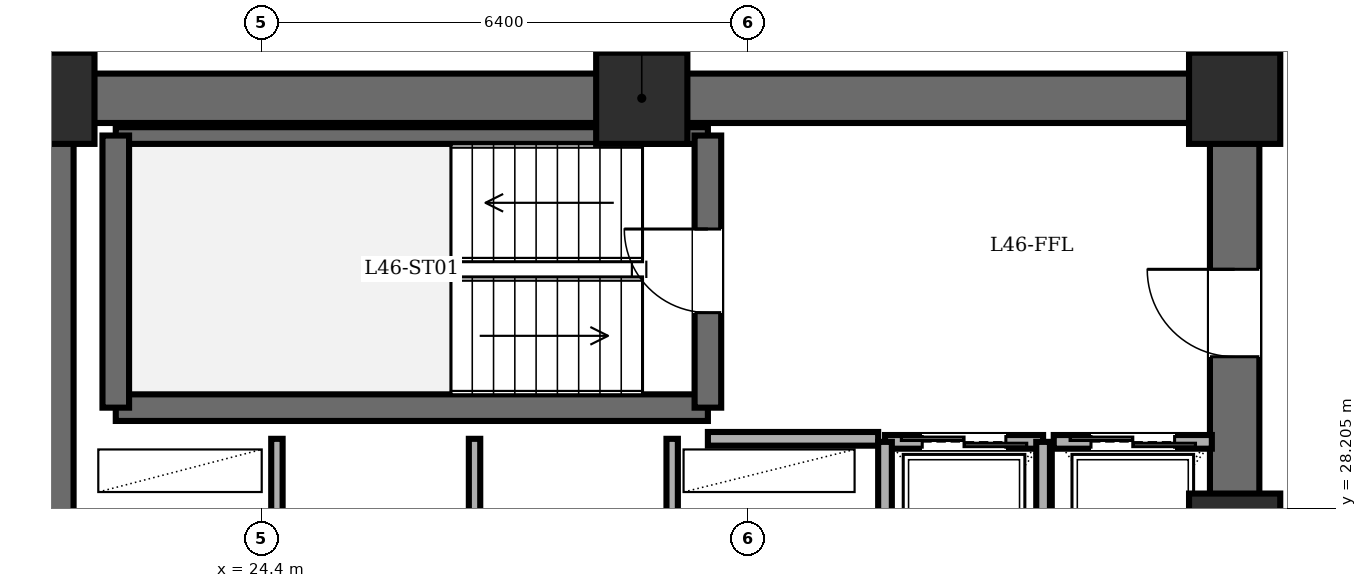
"""IFC4 building model, lengths in metres.
Left out: names, types, materials, properties, quantities, classifications, styles, units other than length and angle.
Written with IfcOpenShell. Run it as: python <this file> out.ifc"""

import sys

from ifc_helpers import new_model, si_unit, direction, frame, frame_2d, origin, origin_2d, place, context, subcontext, project, spatial, rectangle, extrude, element, fill, save


model = new_model("IFC4")
c1 = context("Model", 3, precision=1e-05, world=origin(), true_north=direction((0.0, 1.0)))
c2 = subcontext(c1, "Body", "Model", "MODEL_VIEW")
j1 = project(units=[si_unit("LENGTHUNIT", "METRE"), si_unit("PLANEANGLEUNIT", "RADIAN")], contexts=[c1])
p1 = place(None, origin())
s1 = spatial("IfcSite", under=j1, at=p1, CompositionType="ELEMENT")
p2 = place(p1, origin())
s2 = spatial("IfcBuilding", under=s1, at=p2, CompositionType="ELEMENT")
p3 = place(p2, frame((0.0, 0.0, 176.2)))
s3 = spatial("IfcBuildingStorey", under=s2, at=p3, CompositionType="ELEMENT", Elevation=176.2)
for number, where, z_axis, x_axis in (
    (1, (37.2, 27.8, 0.0), (0.0, 0.0, 1.0), (1.0, 0.0, 0.0)),
    (2, (37.2, 33.6, 0.0), (0.0, 0.0, 1.0), (1.0, 0.0, 0.0)),
    (3, (29.4, 33.6, 0.0), (0.0, 0.0, 1.0), (1.0, 0.0, 0.0)),
    (4, (21.6, 33.6, 0.0), (0.0, 0.0, 1.0), (1.0, 0.0, 0.0)),
):
    element("IfcColumn", number, at=place(p3, frame(where, z_axis=z_axis, x_axis=x_axis)), inside=s3, PredefinedType="COLUMN", context=c2, shape_type="SweptSolid", body=[
        extrude(rectangle(XDim=1.2, YDim=1.2, at=origin_2d()), origin(), (0.0, 0.0, 1.0), 3.6),
    ])
p4 = place(p3, frame((21.6, 14.4, 0.0), z_axis=(0.0, 0.0, 1.0), x_axis=(0.0, 1.0, 0.0)))
e5 = element("IfcWall", 5, at=p4, inside=s3, PredefinedType="SHEAR", context=c2, shape_type="SweptSolid", body=[
    extrude(rectangle(XDim=19.2, YDim=0.65, at=frame_2d((9.6, 0.0))), origin(), (0.0, 0.0, 1.0), 3.4),
])
p5 = place(p3, frame((21.6, 33.6, 0.0), z_axis=(0.0, 0.0, 1.0), x_axis=(1.0, 0.0, 0.0)))
e6 = element("IfcWall", 6, at=p5, inside=s3, PredefinedType="SHEAR", context=c2, shape_type="SweptSolid", body=[
    extrude(rectangle(XDim=15.6, YDim=0.65, at=frame_2d((7.8, 0.0))), origin(), (0.0, 0.0, 1.0), 3.4),
])
p6 = place(p3, frame((37.2, 14.4, 0.0), z_axis=(0.0, 0.0, 1.0), x_axis=(0.0, 1.0, 0.0)))
e7 = element("IfcWall", 7, at=p6, inside=s3, PredefinedType="SHEAR", context=c2, shape_type="SweptSolid", body=[
    extrude(rectangle(XDim=19.2, YDim=0.65, at=frame_2d((9.6, 0.0))), origin(), (0.0, 0.0, 1.0), 3.4),
])
p7 = place(p6, frame((15.8, 0.0, 0.0)))
e8 = element("IfcOpeningElement", 8, at=p7, cuts=e7, PredefinedType="OPENING", context=c2, shape_type="SweptSolid", body=[
    extrude(rectangle(XDim=1.15, YDim=2.15, at=frame_2d((0.575, 1.075))), frame((0.0, 0.335, 0.0), z_axis=(0.0, -1.0, 0.0), x_axis=(1.0, 0.0, 0.0)), (0.0, 0.0, 1.0), 0.67),
])
p8 = place(p6, frame((3.6, 0.0, 0.0)))
e9 = element("IfcOpeningElement", 9, at=p8, cuts=e7, PredefinedType="OPENING", context=c2, shape_type="SweptSolid", body=[
    extrude(rectangle(XDim=1.1, YDim=2.15, at=frame_2d((0.55, 1.075))), frame((0.0, 0.335, 0.0), z_axis=(0.0, -1.0, 0.0), x_axis=(1.0, 0.0, 0.0)), (0.0, 0.0, 1.0), 0.67),
])
p9 = place(p6, frame((8.6, 0.0, 0.0)))
e10 = element("IfcOpeningElement", 10, at=p9, cuts=e7, PredefinedType="OPENING", context=c2, shape_type="SweptSolid", body=[
    extrude(rectangle(XDim=1.3, YDim=2.2, at=frame_2d((0.65, 1.1))), frame((0.0, 0.335, 0.0), z_axis=(0.0, -1.0, 0.0), x_axis=(1.0, 0.0, 0.0)), (0.0, 0.0, 1.0), 0.67),
])
p10 = place(p3, frame((22.48, 29.53, 0.0), z_axis=(0.0, 0.0, 1.0), x_axis=(1.0, 0.0, 0.0)))
e11 = element("IfcWall", 11, at=p10, inside=s3, PredefinedType="SOLIDWALL", context=c2, shape_type="SweptSolid", body=[
    extrude(rectangle(XDim=7.79, YDim=0.35, at=frame_2d((3.895, 0.0))), origin(), (0.0, 0.0, 1.0), 3.4),
])
p11 = place(p3, frame((22.48, 33.11, 0.0), z_axis=(0.0, 0.0, 1.0), x_axis=(1.0, 0.0, 0.0)))
e12 = element("IfcWall", 12, at=p11, inside=s3, PredefinedType="PARTITIONING", context=c2, shape_type="SweptSolid", body=[
    extrude(rectangle(XDim=7.79, YDim=0.22, at=frame_2d((3.895, 0.0))), origin(), (0.0, 0.0, 1.0), 3.4),
])
p12 = place(p3, frame((22.48, 29.53, 0.0), z_axis=(0.0, 0.0, 1.0), x_axis=(0.0, 1.0, 0.0)))
e13 = element("IfcWall", 13, at=p12, inside=s3, PredefinedType="SOLIDWALL", context=c2, shape_type="SweptSolid", body=[
    extrude(rectangle(XDim=3.58, YDim=0.35, at=frame_2d((1.79, 0.0))), origin(), (0.0, 0.0, 1.0), 3.4),
])
p13 = place(p3, frame((30.27, 29.53, 0.0), z_axis=(0.0, 0.0, 1.0), x_axis=(0.0, 1.0, 0.0)))
e14 = element("IfcWall", 14, at=p13, inside=s3, PredefinedType="SOLIDWALL", context=c2, shape_type="SweptSolid", body=[
    extrude(rectangle(XDim=3.58, YDim=0.35, at=frame_2d((1.79, 0.0))), origin(), (0.0, 0.0, 1.0), 3.4),
])
p14 = place(p13, frame((1.25, 0.0, 0.0)))
e15 = element("IfcOpeningElement", 15, at=p14, cuts=e14, PredefinedType="OPENING", context=c2, shape_type="SweptSolid", body=[
    extrude(rectangle(XDim=1.1, YDim=2.15, at=frame_2d((0.55, 1.075))), frame((0.0, 0.185, 0.0), z_axis=(0.0, -1.0, 0.0), x_axis=(1.0, 0.0, 0.0)), (0.0, 0.0, 1.0), 0.37),
])
p15 = place(p3, frame((30.27, 29.12, 0.0), z_axis=(0.0, 0.0, 1.0), x_axis=(1.0, 0.0, 0.0)))
e16 = element("IfcWall", 16, at=p15, inside=s3, PredefinedType="PARTITIONING", context=c2, shape_type="SweptSolid", body=[
    extrude(rectangle(XDim=2.24, YDim=0.18, at=frame_2d((1.12, 0.0))), origin(), (0.0, 0.0, 1.0), 3.4),
])
for number, where, z_axis, x_axis in (
    (17, (24.6, 27.6, 0.0), (0.0, 0.0, 1.0), (0.0, 1.0, 0.0)),
    (18, (27.2, 27.6, 0.0), (0.0, 0.0, 1.0), (0.0, 1.0, 0.0)),
    (19, (29.8, 27.6, 0.0), (0.0, 0.0, 1.0), (0.0, 1.0, 0.0)),
):
    element("IfcWall", number, at=place(p3, frame(where, z_axis=z_axis, x_axis=x_axis)), inside=s3, PredefinedType="PARTITIONING", context=c2, shape_type="SweptSolid", body=[
        extrude(rectangle(XDim=1.52, YDim=0.15, at=frame_2d((0.76, 0.0))), origin(), (0.0, 0.0, 1.0), 3.4),
    ])
p16 = place(p3, frame((32.6, 29.08, 0.0), z_axis=(0.0, 0.0, 1.0), x_axis=(1.0, 0.0, 0.0)))
e20 = element("IfcWall", 20, at=p16, inside=s3, PredefinedType="PARTITIONING", context=c2, shape_type="SweptSolid", body=[
    extrude(rectangle(XDim=2.08, YDim=0.18, at=frame_2d((1.04, 0.0))), origin(), (0.0, 0.0, 1.0), 3.4),
])
p17 = place(p16, frame((0.49, 0.0, 0.0)))
e21 = element("IfcOpeningElement", 21, at=p17, cuts=e20, PredefinedType="OPENING", context=c2, shape_type="SweptSolid", body=[
    extrude(rectangle(XDim=1.1, YDim=2.2, at=frame_2d((0.55, 1.1))), frame((0.0, 0.1, 0.0), z_axis=(0.0, -1.0, 0.0), x_axis=(1.0, 0.0, 0.0)), (0.0, 0.0, 1.0), 0.2),
])
for number, where, z_axis, x_axis in (
    (22, (34.68, 26.35, 0.0), (0.0, 0.0, 1.0), (0.0, 1.0, 0.0)),
    (23, (32.6, 29.08, 0.0), (0.0, 0.0, 1.0), (0.0, -1.0, 0.0)),
):
    element("IfcWall", number, at=place(p3, frame(where, z_axis=z_axis, x_axis=x_axis)), inside=s3, PredefinedType="PARTITIONING", context=c2, shape_type="SweptSolid", body=[
        extrude(rectangle(XDim=2.73, YDim=0.18, at=frame_2d((1.365, 0.0))), origin(), (0.0, 0.0, 1.0), 3.4),
    ])
p18 = place(p3, frame((34.82, 29.08, 0.0), z_axis=(0.0, 0.0, 1.0), x_axis=(1.0, 0.0, 0.0)))
e24 = element("IfcWall", 24, at=p18, inside=s3, PredefinedType="PARTITIONING", context=c2, shape_type="SweptSolid", body=[
    extrude(rectangle(XDim=2.08, YDim=0.18, at=frame_2d((1.04, 0.0))), origin(), (0.0, 0.0, 1.0), 3.4),
])
p19 = place(p18, frame((0.49, 0.0, 0.0)))
e25 = element("IfcOpeningElement", 25, at=p19, cuts=e24, PredefinedType="OPENING", context=c2, shape_type="SweptSolid", body=[
    extrude(rectangle(XDim=1.1, YDim=2.2, at=frame_2d((0.55, 1.1))), frame((0.0, 0.1, 0.0), z_axis=(0.0, -1.0, 0.0), x_axis=(1.0, 0.0, 0.0)), (0.0, 0.0, 1.0), 0.2),
])
p20 = place(p14, origin())
e26 = element("IfcDoor", 26, at=p20, inside=s3, OperationType="SINGLE_SWING_RIGHT", PredefinedType="DOOR", context=c2, shape_type="SweptSolid", body=[
    extrude(rectangle(XDim=1.1, YDim=2.15, at=frame_2d((0.55, 1.075))), frame((0.0, 0.025, 0.0), z_axis=(0.0, -1.0, 0.0), x_axis=(1.0, 0.0, 0.0)), (0.0, 0.0, 1.0), 0.05),
])
fill(e15, e26)
p21 = place(p7, origin())
e27 = element("IfcDoor", 27, at=p21, inside=s3, OperationType="SINGLE_SWING_RIGHT", PredefinedType="DOOR", context=c2, shape_type="SweptSolid", body=[
    extrude(rectangle(XDim=1.15, YDim=2.15, at=frame_2d((0.575, 1.075))), frame((0.0, 0.025, 0.0), z_axis=(0.0, -1.0, 0.0), x_axis=(1.0, 0.0, 0.0)), (0.0, 0.0, 1.0), 0.05),
])
fill(e8, e27)
p22 = place(p17, origin())
e28 = element("IfcDoor", 28, at=p22, inside=s3, OperationType="DOUBLE_DOOR_SLIDING", PredefinedType="DOOR", context=c2, shape_type="SweptSolid", body=[
    extrude(rectangle(XDim=1.1, YDim=2.2, at=frame_2d((0.55, 1.1))), frame((0.0, 0.025, 0.0), z_axis=(0.0, -1.0, 0.0), x_axis=(1.0, 0.0, 0.0)), (0.0, 0.0, 1.0), 0.05),
])
fill(e21, e28)
p23 = place(p19, origin())
e29 = element("IfcDoor", 29, at=p23, inside=s3, OperationType="DOUBLE_DOOR_SLIDING", PredefinedType="DOOR", context=c2, shape_type="SweptSolid", body=[
    extrude(rectangle(XDim=1.1, YDim=2.2, at=frame_2d((0.55, 1.1))), frame((0.0, 0.025, 0.0), z_axis=(0.0, -1.0, 0.0), x_axis=(1.0, 0.0, 0.0)), (0.0, 0.0, 1.0), 0.05),
])
fill(e25, e29)
save(model, sys.argv[1])
